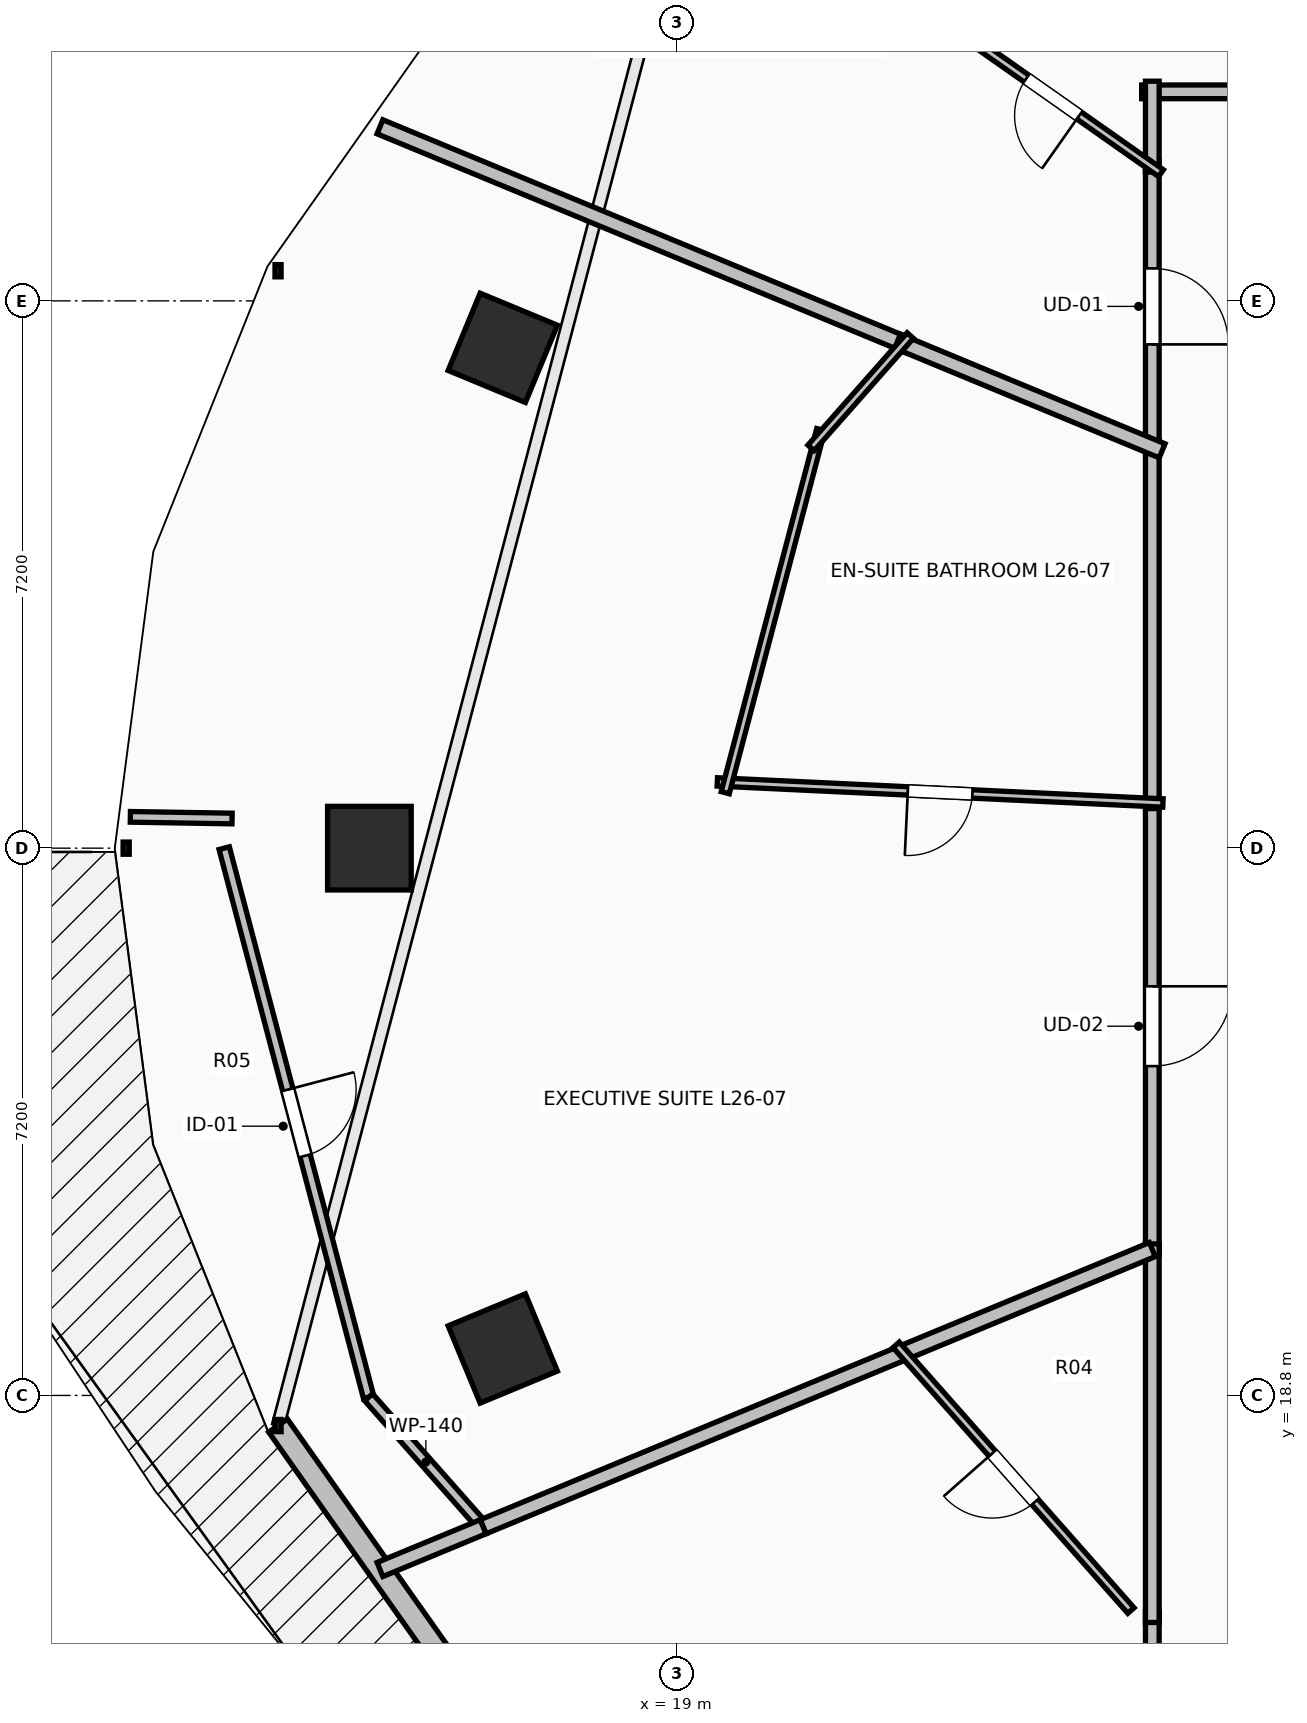
"""IFC4 building model, lengths in metres.
Left out: names, types, materials, properties, quantities, classifications, styles, units other than length and angle.
Written with IfcOpenShell. Run it as: python <this file> out.ifc"""

import sys

from ifc_helpers import new_model, si_unit, direction, frame, frame_2d, origin, origin_2d, place, context, subcontext, project, spatial, rectangle, extrude, element, fill, save


model = new_model("IFC4")
c1 = context("Model", 3, precision=1e-05, world=origin(), true_north=direction((0.0, 1.0)))
c2 = subcontext(c1, "Body", "Model", "MODEL_VIEW")
j1 = project(units=[si_unit("LENGTHUNIT", "METRE"), si_unit("PLANEANGLEUNIT", "RADIAN")], contexts=[c1])
p1 = place(None, origin())
s1 = spatial("IfcSite", under=j1, at=p1, CompositionType="ELEMENT")
p2 = place(p1, origin())
s2 = spatial("IfcBuilding", under=s1, at=p2, CompositionType="ELEMENT")
p3 = place(p2, frame((0.0, 0.0, 99.8)))
s3 = spatial("IfcBuildingStorey", under=s2, at=p3, CompositionType="ELEMENT", Elevation=99.8)
for number, where, z_axis, x_axis in (
    (1, (16.705, 32.582, 0.0), (0.0, 0.0, 1.0), (-0.924, 0.383, 0.0)),
    (2, (14.95, 26.0, 0.0), (0.0, 0.0, 1.0), (-1.0, 0.0, 0.0)),
    (3, (16.705, 19.418, 0.0), (0.0, 0.0, 1.0), (-0.924, -0.383, 0.0)),
):
    element("IfcColumn", number, at=place(p3, frame(where, z_axis=z_axis, x_axis=x_axis)), inside=s3, PredefinedType="COLUMN", context=c2, shape_type="SweptSolid", body=[
        extrude(rectangle(XDim=1.1, YDim=1.1, at=origin_2d()), origin(), (0.0, 0.0, 1.0), 3.5),
    ])
p4 = place(p3, frame((13.748, 18.404, 0.0), z_axis=(0.0, 0.0, 1.0), x_axis=(0.57716435238, -0.81662801222, 0.0)))
e4 = element("IfcWall", 4, at=p4, inside=s3, PredefinedType="STANDARD", context=c2, shape_type="SweptSolid", body=[
    extrude(rectangle(XDim=4.202, YDim=0.3, at=frame_2d((2.101, 0.0))), origin(), (0.0, 0.0, 1.0), 3.24),
])
p5 = place(p3, frame((25.25, 35.034, 0.0), z_axis=(0.0, 0.0, 1.0), x_axis=(0.0, -1.0, 0.0)))
e5 = element("IfcWall", 5, at=p5, inside=s3, PredefinedType="PARTITIONING", context=c2, shape_type="SweptSolid", body=[
    extrude(rectangle(XDim=3.813, YDim=0.18, at=frame_2d((1.906, 0.0))), origin(), (0.0, 0.0, 1.0), 2.432),
])
p6 = place(p5, frame((1.406, 0.0, 0.0)))
e6 = element("IfcOpeningElement", 6, at=p6, cuts=e5, PredefinedType="OPENING", context=c2, shape_type="SweptSolid", body=[
    extrude(rectangle(XDim=1.0, YDim=2.15, at=frame_2d((0.5, 1.075))), frame((0.0, 0.105, 0.0), z_axis=(0.0, -1.0, 0.0), x_axis=(1.0, 0.0, 0.0)), (0.0, 0.0, 1.0), 0.21),
])
p7 = place(p3, frame((28.105, 35.95, 0.0), z_axis=(0.0, 0.0, 1.0), x_axis=(-1.0, 0.0, 0.0)))
e7 = element("IfcWall", 7, at=p7, inside=s3, PredefinedType="PARTITIONING", context=c2, shape_type="SweptSolid", body=[
    extrude(rectangle(XDim=2.995, YDim=0.18, at=frame_2d((1.498, 0.0))), origin(), (0.0, 0.0, 1.0), 2.432),
])
p8 = place(p3, frame((25.25, 36.09, 0.0), z_axis=(0.0, 0.0, 1.0), x_axis=(0.0, -1.0, 0.0)))
e8 = element("IfcWall", 8, at=p8, inside=s3, PredefinedType="PARTITIONING", context=c2, shape_type="SweptSolid", body=[
    extrude(rectangle(XDim=1.196, YDim=0.18, at=frame_2d((0.598, 0.0))), origin(), (0.0, 0.0, 1.0), 2.432),
])
p9 = place(p3, frame((25.25, 26.661, 0.0), z_axis=(0.0, 0.0, 1.0), x_axis=(0.0, -1.0, 0.0)))
e9 = element("IfcWall", 9, at=p9, inside=s3, PredefinedType="PARTITIONING", context=c2, shape_type="SweptSolid", body=[
    extrude(rectangle(XDim=6.007, YDim=0.18, at=frame_2d((3.003, 0.0))), origin(), (0.0, 0.0, 1.0), 3.24),
])
p10 = place(p9, frame((2.479, 0.0, 0.0)))
e10 = element("IfcOpeningElement", 10, at=p10, cuts=e9, PredefinedType="OPENING", context=c2, shape_type="SweptSolid", body=[
    extrude(rectangle(XDim=1.05, YDim=2.2, at=frame_2d((0.525, 1.1))), frame((0.0, 0.105, 0.0), z_axis=(0.0, -1.0, 0.0), x_axis=(1.0, 0.0, 0.0)), (0.0, 0.0, 1.0), 0.21),
])
p11 = place(p3, frame((25.25, 31.361, 0.0), z_axis=(0.0, 0.0, 1.0), x_axis=(0.0, -1.0, 0.0)))
e11 = element("IfcWall", 11, at=p11, inside=s3, PredefinedType="PARTITIONING", context=c2, shape_type="SweptSolid", body=[
    extrude(rectangle(XDim=4.84, YDim=0.18, at=frame_2d((2.42, 0.0))), origin(), (0.0, 0.0, 1.0), 2.432),
])
p12 = place(p3, frame((25.25, 15.953, 0.0), z_axis=(0.0, 0.0, 1.0), x_axis=(0.0, -1.0, 0.0)))
e12 = element("IfcWall", 12, at=p12, inside=s3, PredefinedType="PARTITIONING", context=c2, shape_type="SweptSolid", body=[
    extrude(rectangle(XDim=1.853, YDim=0.18, at=frame_2d((0.926, 0.0))), origin(), (0.0, 0.0, 1.0), 2.432),
])
p13 = place(p3, frame((25.25, 20.794, 0.0), z_axis=(0.0, 0.0, 1.0), x_axis=(0.0, -1.0, 0.0)))
e13 = element("IfcWall", 13, at=p13, inside=s3, PredefinedType="PARTITIONING", context=c2, shape_type="SweptSolid", body=[
    extrude(rectangle(XDim=4.981, YDim=0.18, at=frame_2d((2.49, 0.0))), origin(), (0.0, 0.0, 1.0), 2.432),
])
p14 = place(p3, frame((22.232, 41.768, 0.0), z_axis=(0.0, 0.0, 1.0), x_axis=(0.707106781187, -0.707106781187, 0.0)))
e14 = element("IfcWall", 14, at=p14, inside=s3, PredefinedType="PARTITIONING", context=c2, shape_type="SweptSolid", body=[
    extrude(rectangle(XDim=8.228, YDim=0.2, at=frame_2d((4.114, 0.0))), origin(), (0.0, 0.0, 1.0), 2.432),
])
p15 = place(p3, frame((25.365, 34.881, 0.0), z_axis=(0.0, 0.0, 1.0), x_axis=(-0.81809360258, 0.575085087111, 0.0)))
e15 = element("IfcWall", 15, at=p15, inside=s3, PredefinedType="PARTITIONING", context=c2, shape_type="SweptSolid", body=[
    extrude(rectangle(XDim=3.481, YDim=0.11, at=frame_2d((1.741, 0.0))), origin(), (0.0, 0.0, 1.0), 2.432),
])
p16 = place(p15, frame((1.316, 0.0, 0.0)))
e16 = element("IfcOpeningElement", 16, at=p16, cuts=e15, PredefinedType="OPENING", context=c2, shape_type="SweptSolid", body=[
    extrude(rectangle(XDim=0.85, YDim=2.1, at=frame_2d((0.425, 1.05))), frame((0.0, 0.07, 0.0), z_axis=(0.0, -1.0, 0.0), x_axis=(1.0, 0.0, 0.0)), (0.0, 0.0, 1.0), 0.14),
])
p17 = place(p3, frame((15.089, 35.49, 0.0), z_axis=(0.0, 0.0, 1.0), x_axis=(0.923888472039, -0.382661849723, 0.0)))
e17 = element("IfcWall", 17, at=p17, inside=s3, PredefinedType="PARTITIONING", context=c2, shape_type="SweptSolid", body=[
    extrude(rectangle(XDim=7.51, YDim=0.2, at=frame_2d((3.755, 0.0))), origin(), (0.0, 0.0, 1.0), 2.677),
])
p18 = place(p3, frame((21.899, 32.669, 0.0), z_axis=(0.0, 0.0, 1.0), x_axis=(0.923843852071, -0.382769561211, 0.0)))
e18 = element("IfcWall", 18, at=p18, inside=s3, PredefinedType="PARTITIONING", context=c2, shape_type="SweptSolid", body=[
    extrude(rectangle(XDim=3.768, YDim=0.2, at=frame_2d((1.884, 0.0))), origin(), (0.0, 0.0, 1.0), 2.886),
])
p19 = place(p3, frame((25.39, 26.594, 0.0), z_axis=(0.0, 0.0, 1.0), x_axis=(-0.998884920498, 0.047211392719, 0.0)))
e19 = element("IfcWall", 19, at=p19, inside=s3, PredefinedType="PARTITIONING", context=c2, shape_type="SweptSolid", body=[
    extrude(rectangle(XDim=5.869, YDim=0.11, at=frame_2d((2.935, 0.0))), origin(), (0.0, 0.0, 1.0), 2.432),
])
p20 = place(p19, frame((2.51, 0.0, 0.0)))
e20 = element("IfcOpeningElement", 20, at=p20, cuts=e19, PredefinedType="OPENING", context=c2, shape_type="SweptSolid", body=[
    extrude(rectangle(XDim=0.85, YDim=2.1, at=frame_2d((0.425, 1.05))), frame((0.0, 0.07, 0.0), z_axis=(0.0, -1.0, 0.0), x_axis=(1.0, 0.0, 0.0)), (0.0, 0.0, 1.0), 0.14),
])
p21 = place(p3, frame((19.631, 26.729, 0.0), z_axis=(0.0, 0.0, 1.0), x_axis=(0.254541956306, 0.967061731473, 0.0)))
e21 = element("IfcWall", 21, at=p21, inside=s3, PredefinedType="PARTITIONING", context=c2, shape_type="SweptSolid", body=[
    extrude(rectangle(XDim=4.939, YDim=0.11, at=frame_2d((2.47, 0.0))), origin(), (0.0, 0.0, 1.0), 2.432),
])
p22 = place(p3, frame((20.76, 31.266, 0.0), z_axis=(0.0, 0.0, 1.0), x_axis=(0.662047420969, 0.749461948593, 0.0)))
e22 = element("IfcWall", 22, at=p22, inside=s3, PredefinedType="PARTITIONING", context=c2, shape_type="SweptSolid", body=[
    extrude(rectangle(XDim=1.972, YDim=0.11, at=frame_2d((0.986, 0.0))), origin(), (0.0, 0.0, 1.0), 3.24),
])
p23 = place(p3, frame((11.805, 26.412, 0.0), z_axis=(0.0, 0.0, 1.0), x_axis=(0.999862201843, -0.01660052187, 0.0)))
e23 = element("IfcWall", 23, at=p23, inside=s3, PredefinedType="PARTITIONING", context=c2, shape_type="SweptSolid", body=[
    extrude(rectangle(XDim=1.338, YDim=0.14, at=frame_2d((0.669, 0.0))), origin(), (0.0, 0.0, 1.0), 3.24),
])
p24 = place(p3, frame((13.04, 26.0, 0.0), z_axis=(0.0, 0.0, 1.0), x_axis=(0.254345287821, -0.967113475536, 0.0)))
e24 = element("IfcWall", 24, at=p24, inside=s3, PredefinedType="PARTITIONING", context=c2, shape_type="SweptSolid", body=[
    extrude(rectangle(XDim=7.47, YDim=0.14, at=frame_2d((3.735, 0.0))), origin(), (0.0, 0.0, 1.0), 3.24),
])
p25 = place(p24, frame((3.285, 0.0, 0.0)))
e25 = element("IfcOpeningElement", 25, at=p25, cuts=e24, PredefinedType="OPENING", context=c2, shape_type="SweptSolid", body=[
    extrude(rectangle(XDim=0.9, YDim=2.1, at=frame_2d((0.45, 1.05))), frame((0.0, 0.085, 0.0), z_axis=(0.0, -1.0, 0.0), x_axis=(1.0, 0.0, 0.0)), (0.0, 0.0, 1.0), 0.17),
])
p26 = place(p3, frame((14.94, 18.776, 0.0), z_axis=(0.0, 0.0, 1.0), x_axis=(0.662288913482, -0.749248553605, 0.0)))
e26 = element("IfcWall", 26, at=p26, inside=s3, PredefinedType="PARTITIONING", context=c2, shape_type="SweptSolid", body=[
    extrude(rectangle(XDim=2.274, YDim=0.14, at=frame_2d((1.137, 0.0))), origin(), (0.0, 0.0, 1.0), 3.24),
])
p27 = place(p3, frame((16.446, 17.072, 0.0), z_axis=(0.0, 0.0, 1.0), x_axis=(0.92387006918, 0.382706278068, 0.0)))
e27 = element("IfcWall", 27, at=p27, inside=s3, PredefinedType="PARTITIONING", context=c2, shape_type="SweptSolid", body=[
    extrude(rectangle(XDim=9.53, YDim=0.2, at=frame_2d((4.765, 0.0))), origin(), (0.0, 0.0, 1.0), 2.432),
])
p28 = place(p3, frame((15.089, 16.51, 0.0), z_axis=(0.0, 0.0, 1.0), x_axis=(0.923891226159, 0.382655200183, 0.0)))
e28 = element("IfcWall", 28, at=p28, inside=s3, PredefinedType="PARTITIONING", context=c2, shape_type="SweptSolid", body=[
    extrude(rectangle(XDim=1.469, YDim=0.2, at=frame_2d((0.734, 0.0))), origin(), (0.0, 0.0, 1.0), 3.24),
])
p29 = place(p3, frame((24.969, 15.97, 0.0), z_axis=(0.0, 0.0, 1.0), x_axis=(-0.662106207726, 0.749410014405, 0.0)))
e29 = element("IfcWall", 29, at=p29, inside=s3, PredefinedType="PARTITIONING", context=c2, shape_type="SweptSolid", body=[
    extrude(rectangle(XDim=4.665, YDim=0.11, at=frame_2d((2.332, 0.0))), origin(), (0.0, 0.0, 1.0), 2.432),
])
p30 = place(p29, frame((1.907, 0.0, 0.0)))
e30 = element("IfcOpeningElement", 30, at=p30, cuts=e29, PredefinedType="OPENING", context=c2, shape_type="SweptSolid", body=[
    extrude(rectangle(XDim=0.85, YDim=2.1, at=frame_2d((0.425, 1.05))), frame((0.0, 0.07, 0.0), z_axis=(0.0, -1.0, 0.0), x_axis=(1.0, 0.0, 0.0)), (0.0, 0.0, 1.0), 0.14),
])
p31 = place(p6, origin())
e31 = element("IfcDoor", 31, at=p31, inside=s3, OperationType="SINGLE_SWING_RIGHT", PredefinedType="DOOR", context=c2, shape_type="SweptSolid", body=[
    extrude(rectangle(XDim=1.0, YDim=2.15, at=frame_2d((0.5, 1.075))), frame((0.0, 0.025, 0.0), z_axis=(0.0, -1.0, 0.0), x_axis=(1.0, 0.0, 0.0)), (0.0, 0.0, 1.0), 0.05),
])
fill(e6, e31)
p32 = place(p10, origin())
e32 = element("IfcDoor", 32, at=p32, inside=s3, OperationType="SINGLE_SWING_LEFT", PredefinedType="DOOR", context=c2, shape_type="SweptSolid", body=[
    extrude(rectangle(XDim=1.05, YDim=2.2, at=frame_2d((0.525, 1.1))), frame((0.0, 0.025, 0.0), z_axis=(0.0, -1.0, 0.0), x_axis=(1.0, 0.0, 0.0)), (0.0, 0.0, 1.0), 0.05),
])
fill(e10, e32)
p33 = place(p16, origin())
e33 = element("IfcDoor", 33, at=p33, inside=s3, OperationType="SINGLE_SWING_LEFT", PredefinedType="DOOR", context=c2, shape_type="SweptSolid", body=[
    extrude(rectangle(XDim=0.85, YDim=2.1, at=frame_2d((0.425, 1.05))), frame((0.0, 0.025, 0.0), z_axis=(0.0, -1.0, 0.0), x_axis=(1.0, 0.0, 0.0)), (0.0, 0.0, 1.0), 0.05),
])
fill(e16, e33)
p34 = place(p20, origin())
e34 = element("IfcDoor", 34, at=p34, inside=s3, OperationType="SINGLE_SWING_RIGHT", PredefinedType="DOOR", context=c2, shape_type="SweptSolid", body=[
    extrude(rectangle(XDim=0.85, YDim=2.1, at=frame_2d((0.425, 1.05))), frame((0.0, 0.025, 0.0), z_axis=(0.0, -1.0, 0.0), x_axis=(1.0, 0.0, 0.0)), (0.0, 0.0, 1.0), 0.05),
])
fill(e20, e34)
p35 = place(p25, origin())
e35 = element("IfcDoor", 35, at=p35, inside=s3, OperationType="SINGLE_SWING_LEFT", PredefinedType="DOOR", context=c2, shape_type="SweptSolid", body=[
    extrude(rectangle(XDim=0.9, YDim=2.1, at=frame_2d((0.45, 1.05))), frame((0.0, 0.025, 0.0), z_axis=(0.0, -1.0, 0.0), x_axis=(1.0, 0.0, 0.0)), (0.0, 0.0, 1.0), 0.05),
])
fill(e25, e35)
p36 = place(p30, origin())
e36 = element("IfcDoor", 36, at=p36, inside=s3, OperationType="SINGLE_SWING_RIGHT", PredefinedType="DOOR", context=c2, shape_type="SweptSolid", body=[
    extrude(rectangle(XDim=0.85, YDim=2.1, at=frame_2d((0.425, 1.05))), frame((0.0, 0.025, 0.0), z_axis=(0.0, -1.0, 0.0), x_axis=(1.0, 0.0, 0.0)), (0.0, 0.0, 1.0), 0.05),
])
fill(e30, e36)
save(model, sys.argv[1])
